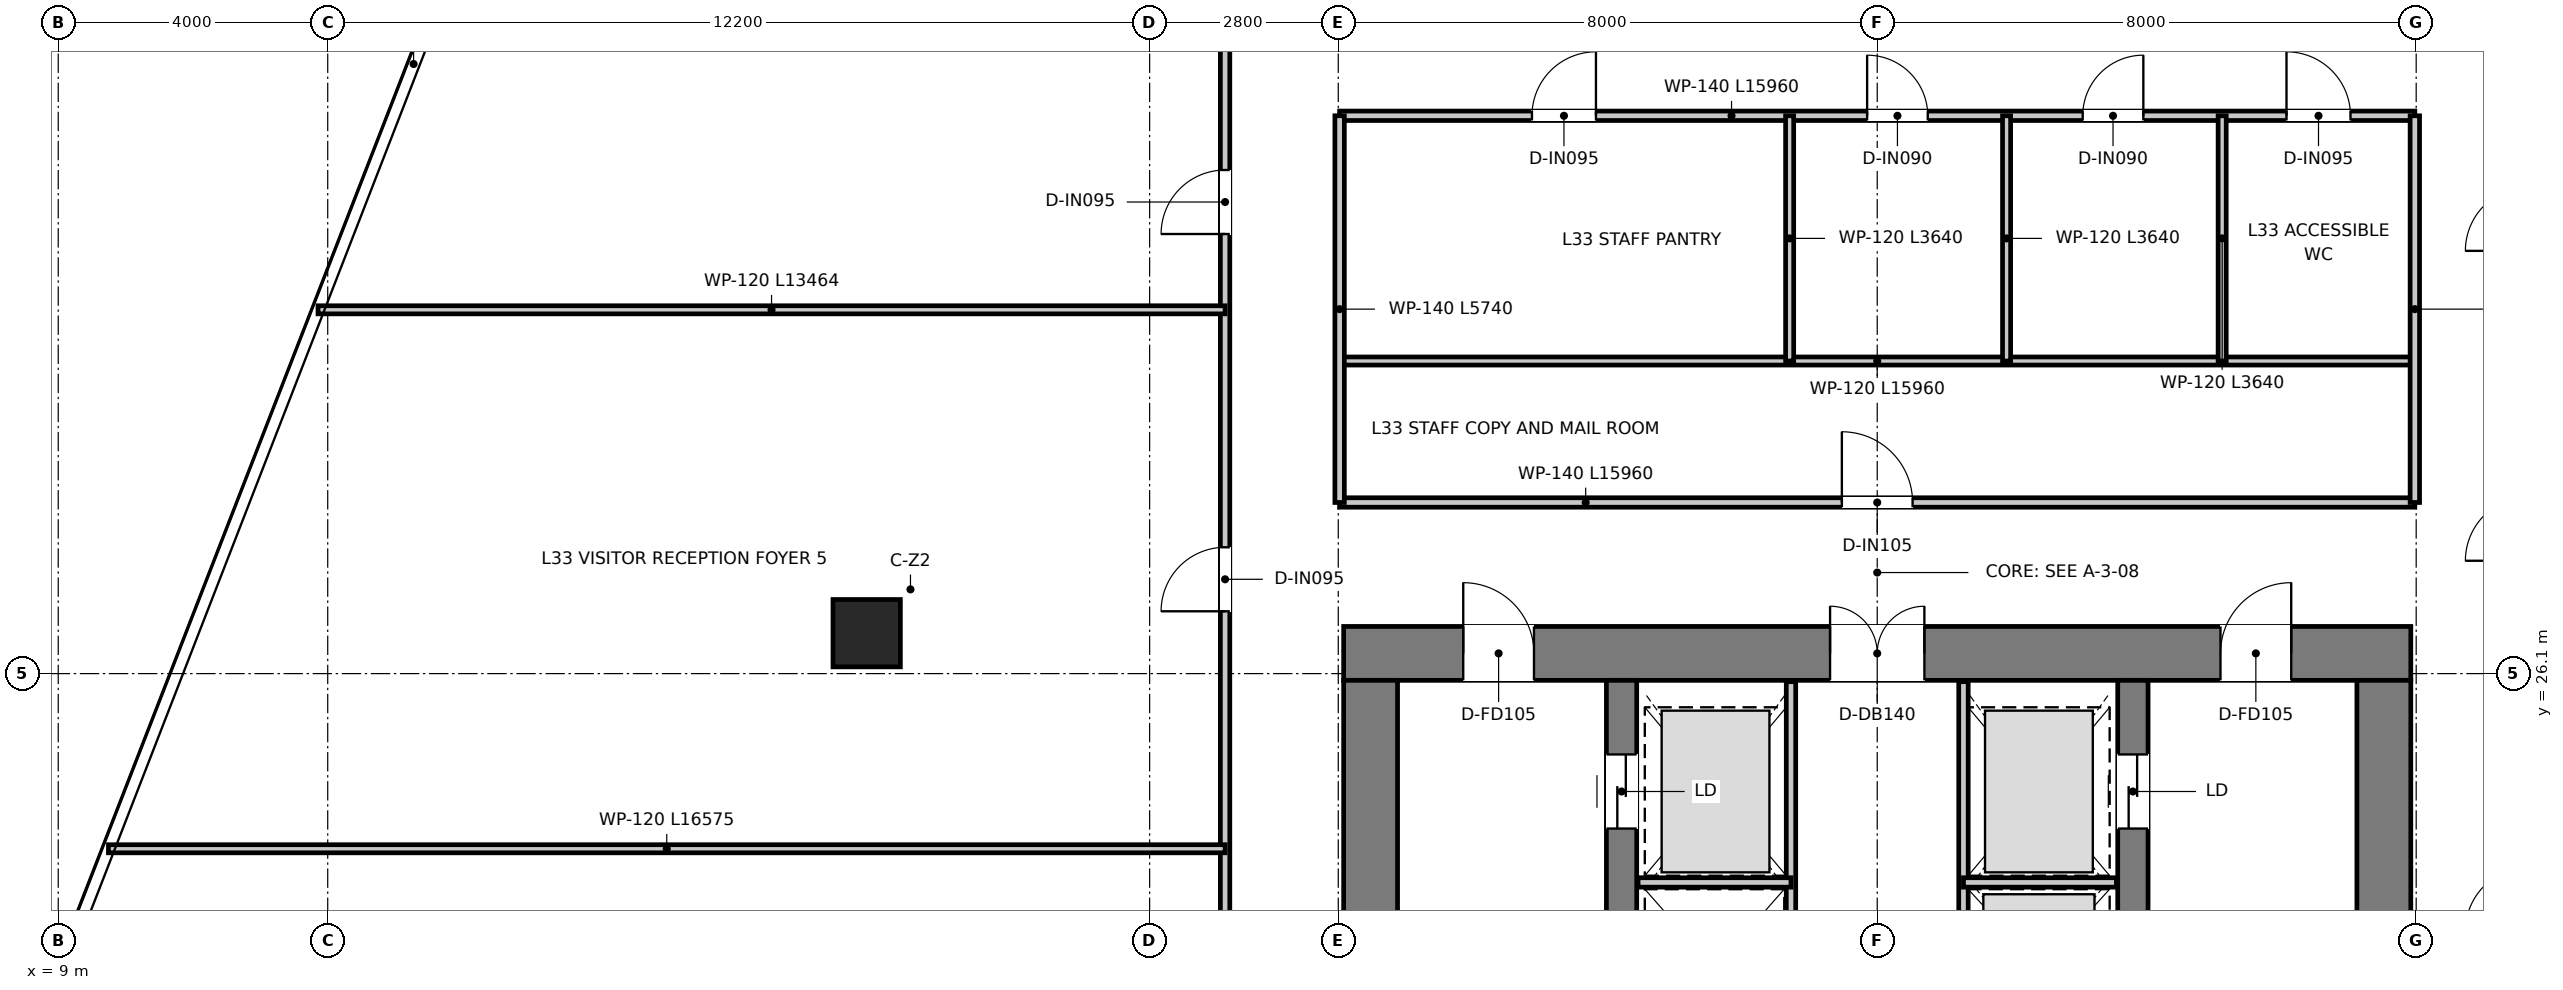
"""IFC4 building model, lengths in metres.
Left out: names, types, materials, properties, quantities, classifications, styles, units other than length and angle.
Written with IfcOpenShell. Run it as: python <this file> out.ifc"""

import sys

from ifc_helpers import new_model, si_unit, direction, frame, frame_2d, origin, origin_2d, place, context, subcontext, project, spatial, rectangle, extrude, source, transform, mapped, element, fill, save


model = new_model("IFC4")
c1 = context("Model", 3, precision=1e-05, world=origin(), true_north=direction((0.0, 1.0)))
c2 = subcontext(c1, "Body", "Model", "MODEL_VIEW")
j1 = project(units=[si_unit("LENGTHUNIT", "METRE"), si_unit("PLANEANGLEUNIT", "RADIAN")], contexts=[c1])
p1 = place(None, origin())
s1 = spatial("IfcSite", under=j1, at=p1, CompositionType="ELEMENT")
p2 = place(p1, origin())
s2 = spatial("IfcBuilding", under=s1, at=p2, CompositionType="ELEMENT")
p3 = place(p2, frame((0.0, 0.0, 137.45)))
s3 = spatial("IfcBuildingStorey", under=s2, at=p3, CompositionType="ELEMENT", Elevation=137.45)
p4 = place(p3, frame((28.08, 26.4, 0.0), z_axis=(0.0, 0.0, 1.0), x_axis=(1.0, 0.0, 0.0)))
e1 = element("IfcWall", 1, at=p4, inside=s3, PredefinedType="SHEAR", context=c2, shape_type="SweptSolid", body=[
    extrude(rectangle(XDim=15.84, YDim=0.8, at=frame_2d((7.92, 0.0))), origin(), (0.0, 0.0, 1.0), 3.95),
])
p5 = place(p4, frame((7.22, 0.0, 0.0)))
e2 = element("IfcOpeningElement", 2, at=p5, cuts=e1, PredefinedType="OPENING", context=c2, shape_type="SweptSolid", body=[
    extrude(rectangle(XDim=1.4, YDim=2.2, at=frame_2d((0.7, 1.1))), frame((0.0, 0.41, 0.0), z_axis=(0.0, -1.0, 0.0), x_axis=(1.0, 0.0, 0.0)), (0.0, 0.0, 1.0), 0.82),
])
p6 = place(p4, frame((1.775, 0.0, 0.0)))
e3 = element("IfcOpeningElement", 3, at=p6, cuts=e1, PredefinedType="OPENING", context=c2, shape_type="SweptSolid", body=[
    extrude(rectangle(XDim=1.05, YDim=2.1, at=frame_2d((0.525, 1.05))), frame((0.0, 0.41, 0.0), z_axis=(0.0, -1.0, 0.0), x_axis=(1.0, 0.0, 0.0)), (0.0, 0.0, 1.0), 0.82),
])
p7 = place(p4, frame((13.015, 0.0, 0.0)))
e4 = element("IfcOpeningElement", 4, at=p7, cuts=e1, PredefinedType="OPENING", context=c2, shape_type="SweptSolid", body=[
    extrude(rectangle(XDim=1.05, YDim=2.1, at=frame_2d((0.525, 1.05))), frame((0.0, 0.41, 0.0), z_axis=(0.0, -1.0, 0.0), x_axis=(1.0, 0.0, 0.0)), (0.0, 0.0, 1.0), 0.82),
])
for number, where, z_axis, x_axis in (
    (5, (28.48, 11.3, 0.0), (0.0, 0.0, 1.0), (0.0, 1.0, 0.0)),
    (6, (43.52, 11.3, 0.0), (0.0, 0.0, 1.0), (0.0, 1.0, 0.0)),
):
    element("IfcWall", number, at=place(p3, frame(where, z_axis=z_axis, x_axis=x_axis)), inside=s3, PredefinedType="SHEAR", context=c2, shape_type="SweptSolid", body=[
        extrude(rectangle(XDim=14.7, YDim=0.8, at=frame_2d((7.35, 0.0))), origin(), (0.0, 0.0, 1.0), 3.95),
    ])
p8 = place(p3, frame((32.205, 13.22, 0.0), z_axis=(0.0, 0.0, 1.0), x_axis=(0.0, 1.0, 0.0)))
e7 = element("IfcWall", 7, at=p8, inside=s3, PredefinedType="SHEAR", context=c2, shape_type="SweptSolid", body=[
    extrude(rectangle(XDim=12.78, YDim=0.45, at=frame_2d((6.39, 0.0))), origin(), (0.0, 0.0, 1.0), 3.95),
])
p9 = place(p8, frame((10.58, 0.0, 0.0)))
e8 = element("IfcOpeningElement", 8, at=p9, cuts=e7, PredefinedType="OPENING", context=c2, shape_type="SweptSolid", body=[
    extrude(rectangle(XDim=1.1, YDim=2.15, at=frame_2d((0.55, 1.075))), frame((0.0, 0.235, 0.0), z_axis=(0.0, -1.0, 0.0), x_axis=(1.0, 0.0, 0.0)), (0.0, 0.0, 1.0), 0.47),
])
p10 = place(p3, frame((39.795, 13.22, 0.0), z_axis=(0.0, 0.0, 1.0), x_axis=(0.0, 1.0, 0.0)))
e9 = element("IfcWall", 9, at=p10, inside=s3, PredefinedType="SHEAR", context=c2, shape_type="SweptSolid", body=[
    extrude(rectangle(XDim=12.78, YDim=0.45, at=frame_2d((6.39, 0.0))), origin(), (0.0, 0.0, 1.0), 3.95),
])
p11 = place(p10, frame((10.58, 0.0, 0.0)))
e10 = element("IfcOpeningElement", 10, at=p11, cuts=e9, PredefinedType="OPENING", context=c2, shape_type="SweptSolid", body=[
    extrude(rectangle(XDim=1.1, YDim=2.15, at=frame_2d((0.55, 1.075))), frame((0.0, 0.235, 0.0), z_axis=(0.0, -1.0, 0.0), x_axis=(1.0, 0.0, 0.0)), (0.0, 0.0, 1.0), 0.47),
])
m1 = source(origin(), c2, "Body", "SweptSolid", [
    extrude(rectangle(XDim=1.0, YDim=1.0, at=origin_2d()), origin(), (0.0, 0.0, 1.0), 3.95),
])
p12 = place(p3, frame((21.0, 26.7, 0.0), z_axis=(0.0, 0.0, 1.0), x_axis=(1.0, 0.0, 0.0)))
e11 = element("IfcColumn", 11, at=p12, inside=s3, PredefinedType="COLUMN", context=c2, shape_type="MappedRepresentation", body=[
    mapped(m1, transform((0.0, 0.0, 0.0), x_axis=(1.0, 0.0, 0.0), y_axis=(0.0, 1.0, 0.0), z_axis=(0.0, 0.0, 1.0), scale=1.0)),
])
p13 = place(p3, frame((34.72, 20.2, 0.0), z_axis=(0.0, 0.0, 1.0), x_axis=(0.0, 1.0, 0.0)))
e12 = element("IfcWall", 12, at=p13, inside=s3, PredefinedType="PARTITIONING", context=c2, shape_type="SweptSolid", body=[
    extrude(rectangle(XDim=5.78, YDim=0.14, at=frame_2d((2.89, 0.0))), origin(), (0.0, 0.0, 1.0), 2.6),
])
p14 = place(p13, frame((1.05, 0.0, 0.0)))
e13 = element("IfcOpeningElement", 13, at=p14, cuts=e12, PredefinedType="OPENING", context=c2, shape_type="SweptSolid", body=[
    extrude(rectangle(XDim=0.9, YDim=2.1, at=frame_2d((0.45, 1.05))), frame((0.0, 0.08, 0.0), z_axis=(0.0, -1.0, 0.0), x_axis=(1.0, 0.0, 0.0)), (0.0, 0.0, 1.0), 0.16),
])
p15 = place(p3, frame((37.28, 20.2, 0.0), z_axis=(0.0, 0.0, 1.0), x_axis=(0.0, 1.0, 0.0)))
e14 = element("IfcWall", 14, at=p15, inside=s3, PredefinedType="PARTITIONING", context=c2, shape_type="SweptSolid", body=[
    extrude(rectangle(XDim=5.78, YDim=0.14, at=frame_2d((2.89, 0.0))), origin(), (0.0, 0.0, 1.0), 2.6),
])
p16 = place(p15, frame((0.95, 0.0, 0.0)))
e15 = element("IfcOpeningElement", 15, at=p16, cuts=e14, PredefinedType="OPENING", context=c2, shape_type="SweptSolid", body=[
    extrude(rectangle(XDim=1.1, YDim=2.15, at=frame_2d((0.55, 1.075))), frame((0.0, 0.08, 0.0), z_axis=(0.0, -1.0, 0.0), x_axis=(1.0, 0.0, 0.0)), (0.0, 0.0, 1.0), 0.16),
])
for number, where, z_axis, x_axis in (
    (16, (32.45, 23.0, 0.0), (0.0, 0.0, 1.0), (1.0, 0.0, 0.0)),
    (17, (37.28, 23.0, 0.0), (0.0, 0.0, 1.0), (1.0, 0.0, 0.0)),
):
    element("IfcWall", number, at=place(p3, frame(where, z_axis=z_axis, x_axis=x_axis)), inside=s3, PredefinedType="PARTITIONING", context=c2, shape_type="SweptSolid", body=[
        extrude(rectangle(XDim=2.27, YDim=0.14, at=frame_2d((1.135, 0.0))), origin(), (0.0, 0.0, 1.0), 2.6),
    ])
p17 = place(p3, frame((28.02, 28.64, 0.0), z_axis=(0.0, 0.0, 1.0), x_axis=(1.0, 0.0, 0.0)))
e18 = element("IfcWall", 18, at=p17, inside=s3, PredefinedType="PARTITIONING", context=c2, shape_type="SweptSolid", body=[
    extrude(rectangle(XDim=15.96, YDim=0.14, at=frame_2d((7.98, 0.0))), origin(), (0.0, 0.0, 1.0), 3.01),
])
p18 = place(p17, frame((7.455, 0.0, 0.0)))
e19 = element("IfcOpeningElement", 19, at=p18, cuts=e18, PredefinedType="OPENING", context=c2, shape_type="SweptSolid", body=[
    extrude(rectangle(XDim=1.05, YDim=2.15, at=frame_2d((0.525, 1.075))), frame((0.0, 0.08, 0.0), z_axis=(0.0, -1.0, 0.0), x_axis=(1.0, 0.0, 0.0)), (0.0, 0.0, 1.0), 0.16),
])
p19 = place(p3, frame((28.02, 30.74, 0.0), z_axis=(0.0, 0.0, 1.0), x_axis=(1.0, 0.0, 0.0)))
e20 = element("IfcWall", 20, at=p19, inside=s3, PredefinedType="PARTITIONING", context=c2, shape_type="SweptSolid", body=[
    extrude(rectangle(XDim=15.96, YDim=0.12, at=frame_2d((7.98, 0.0))), origin(), (0.0, 0.0, 1.0), 3.01),
])
p20 = place(p3, frame((28.02, 34.38, 0.0), z_axis=(0.0, 0.0, 1.0), x_axis=(1.0, 0.0, 0.0)))
e21 = element("IfcWall", 21, at=p20, inside=s3, PredefinedType="PARTITIONING", context=c2, shape_type="SweptSolid", body=[
    extrude(rectangle(XDim=15.96, YDim=0.14, at=frame_2d((7.98, 0.0))), origin(), (0.0, 0.0, 1.0), 3.01),
])
p21 = place(p20, frame((7.83, 0.0, 0.0)))
e22 = element("IfcOpeningElement", 22, at=p21, cuts=e21, PredefinedType="OPENING", context=c2, shape_type="SweptSolid", body=[
    extrude(rectangle(XDim=0.9, YDim=2.1, at=frame_2d((0.45, 1.05))), frame((0.0, 0.08, 0.0), z_axis=(0.0, -1.0, 0.0), x_axis=(1.0, 0.0, 0.0)), (0.0, 0.0, 1.0), 0.16),
])
p22 = place(p20, frame((11.03, 0.0, 0.0)))
e23 = element("IfcOpeningElement", 23, at=p22, cuts=e21, PredefinedType="OPENING", context=c2, shape_type="SweptSolid", body=[
    extrude(rectangle(XDim=0.9, YDim=2.1, at=frame_2d((0.45, 1.05))), frame((0.0, 0.08, 0.0), z_axis=(0.0, -1.0, 0.0), x_axis=(1.0, 0.0, 0.0)), (0.0, 0.0, 1.0), 0.16),
])
p23 = place(p20, frame((14.055, 0.0, 0.0)))
e24 = element("IfcOpeningElement", 24, at=p23, cuts=e21, PredefinedType="OPENING", context=c2, shape_type="SweptSolid", body=[
    extrude(rectangle(XDim=0.95, YDim=2.1, at=frame_2d((0.475, 1.05))), frame((0.0, 0.08, 0.0), z_axis=(0.0, -1.0, 0.0), x_axis=(1.0, 0.0, 0.0)), (0.0, 0.0, 1.0), 0.16),
])
p24 = place(p20, frame((2.855, 0.0, 0.0)))
e25 = element("IfcOpeningElement", 25, at=p24, cuts=e21, PredefinedType="OPENING", context=c2, shape_type="SweptSolid", body=[
    extrude(rectangle(XDim=0.95, YDim=2.1, at=frame_2d((0.475, 1.05))), frame((0.0, 0.08, 0.0), z_axis=(0.0, -1.0, 0.0), x_axis=(1.0, 0.0, 0.0)), (0.0, 0.0, 1.0), 0.16),
])
for number, where, z_axis, x_axis in (
    (26, (28.02, 28.64, 0.0), (0.0, 0.0, 1.0), (0.0, 1.0, 0.0)),
    (27, (43.98, 28.64, 0.0), (0.0, 0.0, 1.0), (0.0, 1.0, 0.0)),
):
    element("IfcWall", number, at=place(p3, frame(where, z_axis=z_axis, x_axis=x_axis)), inside=s3, PredefinedType="PARTITIONING", context=c2, shape_type="SweptSolid", body=[
        extrude(rectangle(XDim=5.74, YDim=0.14, at=frame_2d((2.87, 0.0))), origin(), (0.0, 0.0, 1.0), 3.2),
    ])
for number, where, z_axis, x_axis in (
    (28, (37.92, 30.74, 0.0), (0.0, 0.0, 1.0), (0.0, 1.0, 0.0)),
    (29, (41.12, 30.74, 0.0), (0.0, 0.0, 1.0), (0.0, 1.0, 0.0)),
    (30, (34.7, 30.74, 0.0), (0.0, 0.0, 1.0), (0.0, 1.0, 0.0)),
):
    element("IfcWall", number, at=place(p3, frame(where, z_axis=z_axis, x_axis=x_axis)), inside=s3, PredefinedType="PARTITIONING", context=c2, shape_type="SweptSolid", body=[
        extrude(rectangle(XDim=3.64, YDim=0.12, at=frame_2d((1.82, 0.0))), origin(), (0.0, 0.0, 1.0), 3.1),
    ])
p25 = place(p3, frame((26.32, 10.5, 0.0), z_axis=(0.0, 0.0, 1.0), x_axis=(0.0, 1.0, 0.0)))
e31 = element("IfcWall", 31, at=p25, inside=s3, PredefinedType="PARTITIONING", context=c2, shape_type="SweptSolid", body=[
    extrude(rectangle(XDim=25.62, YDim=0.14, at=frame_2d((12.81, 0.0))), origin(), (0.0, 0.0, 1.0), 2.9),
])
p26 = place(p25, frame((9.525, 0.0, 0.0)))
e32 = element("IfcOpeningElement", 32, at=p26, cuts=e31, PredefinedType="OPENING", context=c2, shape_type="SweptSolid", body=[
    extrude(rectangle(XDim=0.95, YDim=2.1, at=frame_2d((0.475, 1.05))), frame((0.0, 0.08, 0.0), z_axis=(0.0, -1.0, 0.0), x_axis=(1.0, 0.0, 0.0)), (0.0, 0.0, 1.0), 0.16),
])
p27 = place(p25, frame((16.525, 0.0, 0.0)))
e33 = element("IfcOpeningElement", 33, at=p27, cuts=e31, PredefinedType="OPENING", context=c2, shape_type="SweptSolid", body=[
    extrude(rectangle(XDim=0.95, YDim=2.1, at=frame_2d((0.475, 1.05))), frame((0.0, 0.08, 0.0), z_axis=(0.0, -1.0, 0.0), x_axis=(1.0, 0.0, 0.0)), (0.0, 0.0, 1.0), 0.16),
])
p28 = place(p25, frame((22.125, 0.0, 0.0)))
e34 = element("IfcOpeningElement", 34, at=p28, cuts=e31, PredefinedType="OPENING", context=c2, shape_type="SweptSolid", body=[
    extrude(rectangle(XDim=0.95, YDim=2.1, at=frame_2d((0.475, 1.05))), frame((0.0, 0.08, 0.0), z_axis=(0.0, -1.0, 0.0), x_axis=(1.0, 0.0, 0.0)), (0.0, 0.0, 1.0), 0.16),
])
p29 = place(p3, frame((9.745, 23.5, 0.0), z_axis=(0.0, 0.0, 1.0), x_axis=(1.0, 0.0, 0.0)))
e35 = element("IfcWall", 35, at=p29, inside=s3, PredefinedType="PARTITIONING", context=c2, shape_type="SweptSolid", body=[
    extrude(rectangle(XDim=16.575, YDim=0.12, at=frame_2d((8.288, 0.0))), origin(), (0.0, 0.0, 1.0), 2.9),
])
p30 = place(p3, frame((12.856, 31.5, 0.0), z_axis=(0.0, 0.0, 1.0), x_axis=(1.0, 0.0, 0.0)))
e36 = element("IfcWall", 36, at=p30, inside=s3, PredefinedType="PARTITIONING", context=c2, shape_type="SweptSolid", body=[
    extrude(rectangle(XDim=13.464, YDim=0.12, at=frame_2d((6.732, 0.0))), origin(), (0.0, 0.0, 1.0), 2.9),
])
p31 = place(p5, origin())
e37 = element("IfcDoor", 37, at=p31, inside=s3, OperationType="DOUBLE_DOOR_SINGLE_SWING", PredefinedType="DOOR", context=c2, shape_type="SweptSolid", body=[
    extrude(rectangle(XDim=1.4, YDim=2.2, at=frame_2d((0.7, 1.1))), frame((0.0, 0.025, 0.0), z_axis=(0.0, -1.0, 0.0), x_axis=(1.0, 0.0, 0.0)), (0.0, 0.0, 1.0), 0.05),
])
fill(e2, e37)
p32 = place(p6, origin())
e38 = element("IfcDoor", 38, at=p32, inside=s3, OperationType="SINGLE_SWING_LEFT", PredefinedType="DOOR", context=c2, shape_type="SweptSolid", body=[
    extrude(rectangle(XDim=1.05, YDim=2.1, at=frame_2d((0.525, 1.05))), frame((0.0, 0.025, 0.0), z_axis=(0.0, -1.0, 0.0), x_axis=(1.0, 0.0, 0.0)), (0.0, 0.0, 1.0), 0.05),
])
fill(e3, e38)
p33 = place(p7, origin())
e39 = element("IfcDoor", 39, at=p33, inside=s3, OperationType="SINGLE_SWING_RIGHT", PredefinedType="DOOR", context=c2, shape_type="SweptSolid", body=[
    extrude(rectangle(XDim=1.05, YDim=2.1, at=frame_2d((0.525, 1.05))), frame((0.0, 0.025, 0.0), z_axis=(0.0, -1.0, 0.0), x_axis=(1.0, 0.0, 0.0)), (0.0, 0.0, 1.0), 0.05),
])
fill(e4, e39)
p34 = place(p9, origin())
e40 = element("IfcDoor", 40, at=p34, inside=s3, OperationType="DOUBLE_DOOR_SLIDING", PredefinedType="DOOR", context=c2, shape_type="SweptSolid", body=[
    extrude(rectangle(XDim=1.1, YDim=2.15, at=frame_2d((0.55, 1.075))), frame((0.0, 0.025, 0.0), z_axis=(0.0, -1.0, 0.0), x_axis=(1.0, 0.0, 0.0)), (0.0, 0.0, 1.0), 0.05),
])
fill(e8, e40)
p35 = place(p11, origin())
e41 = element("IfcDoor", 41, at=p35, inside=s3, OperationType="DOUBLE_DOOR_SLIDING", PredefinedType="DOOR", context=c2, shape_type="SweptSolid", body=[
    extrude(rectangle(XDim=1.1, YDim=2.15, at=frame_2d((0.55, 1.075))), frame((0.0, 0.025, 0.0), z_axis=(0.0, -1.0, 0.0), x_axis=(1.0, 0.0, 0.0)), (0.0, 0.0, 1.0), 0.05),
])
fill(e10, e41)
p36 = place(p18, origin())
e42 = element("IfcDoor", 42, at=p36, inside=s3, OperationType="SINGLE_SWING_LEFT", PredefinedType="DOOR", context=c2, shape_type="SweptSolid", body=[
    extrude(rectangle(XDim=1.05, YDim=2.15, at=frame_2d((0.525, 1.075))), frame((0.0, 0.025, 0.0), z_axis=(0.0, -1.0, 0.0), x_axis=(1.0, 0.0, 0.0)), (0.0, 0.0, 1.0), 0.05),
])
fill(e19, e42)
p37 = place(p21, origin())
e43 = element("IfcDoor", 43, at=p37, inside=s3, OperationType="SINGLE_SWING_LEFT", PredefinedType="DOOR", context=c2, shape_type="SweptSolid", body=[
    extrude(rectangle(XDim=0.9, YDim=2.1, at=frame_2d((0.45, 1.05))), frame((0.0, 0.025, 0.0), z_axis=(0.0, -1.0, 0.0), x_axis=(1.0, 0.0, 0.0)), (0.0, 0.0, 1.0), 0.05),
])
fill(e22, e43)
p38 = place(p22, origin())
e44 = element("IfcDoor", 44, at=p38, inside=s3, OperationType="SINGLE_SWING_RIGHT", PredefinedType="DOOR", context=c2, shape_type="SweptSolid", body=[
    extrude(rectangle(XDim=0.9, YDim=2.1, at=frame_2d((0.45, 1.05))), frame((0.0, 0.025, 0.0), z_axis=(0.0, -1.0, 0.0), x_axis=(1.0, 0.0, 0.0)), (0.0, 0.0, 1.0), 0.05),
])
fill(e23, e44)
p39 = place(p23, origin())
e45 = element("IfcDoor", 45, at=p39, inside=s3, OperationType="SINGLE_SWING_LEFT", PredefinedType="DOOR", context=c2, shape_type="SweptSolid", body=[
    extrude(rectangle(XDim=0.95, YDim=2.1, at=frame_2d((0.475, 1.05))), frame((0.0, 0.025, 0.0), z_axis=(0.0, -1.0, 0.0), x_axis=(1.0, 0.0, 0.0)), (0.0, 0.0, 1.0), 0.05),
])
fill(e24, e45)
p40 = place(p24, origin())
e46 = element("IfcDoor", 46, at=p40, inside=s3, OperationType="SINGLE_SWING_RIGHT", PredefinedType="DOOR", context=c2, shape_type="SweptSolid", body=[
    extrude(rectangle(XDim=0.95, YDim=2.1, at=frame_2d((0.475, 1.05))), frame((0.0, 0.025, 0.0), z_axis=(0.0, -1.0, 0.0), x_axis=(1.0, 0.0, 0.0)), (0.0, 0.0, 1.0), 0.05),
])
fill(e25, e46)
p41 = place(p27, origin())
e47 = element("IfcDoor", 47, at=p41, inside=s3, OperationType="SINGLE_SWING_LEFT", PredefinedType="DOOR", context=c2, shape_type="SweptSolid", body=[
    extrude(rectangle(XDim=0.95, YDim=2.1, at=frame_2d((0.475, 1.05))), frame((0.0, 0.025, 0.0), z_axis=(0.0, -1.0, 0.0), x_axis=(1.0, 0.0, 0.0)), (0.0, 0.0, 1.0), 0.05),
])
fill(e33, e47)
p42 = place(p28, origin())
e48 = element("IfcDoor", 48, at=p42, inside=s3, OperationType="SINGLE_SWING_LEFT", PredefinedType="DOOR", context=c2, shape_type="SweptSolid", body=[
    extrude(rectangle(XDim=0.95, YDim=2.1, at=frame_2d((0.475, 1.05))), frame((0.0, 0.025, 0.0), z_axis=(0.0, -1.0, 0.0), x_axis=(1.0, 0.0, 0.0)), (0.0, 0.0, 1.0), 0.05),
])
fill(e34, e48)
save(model, sys.argv[1])
